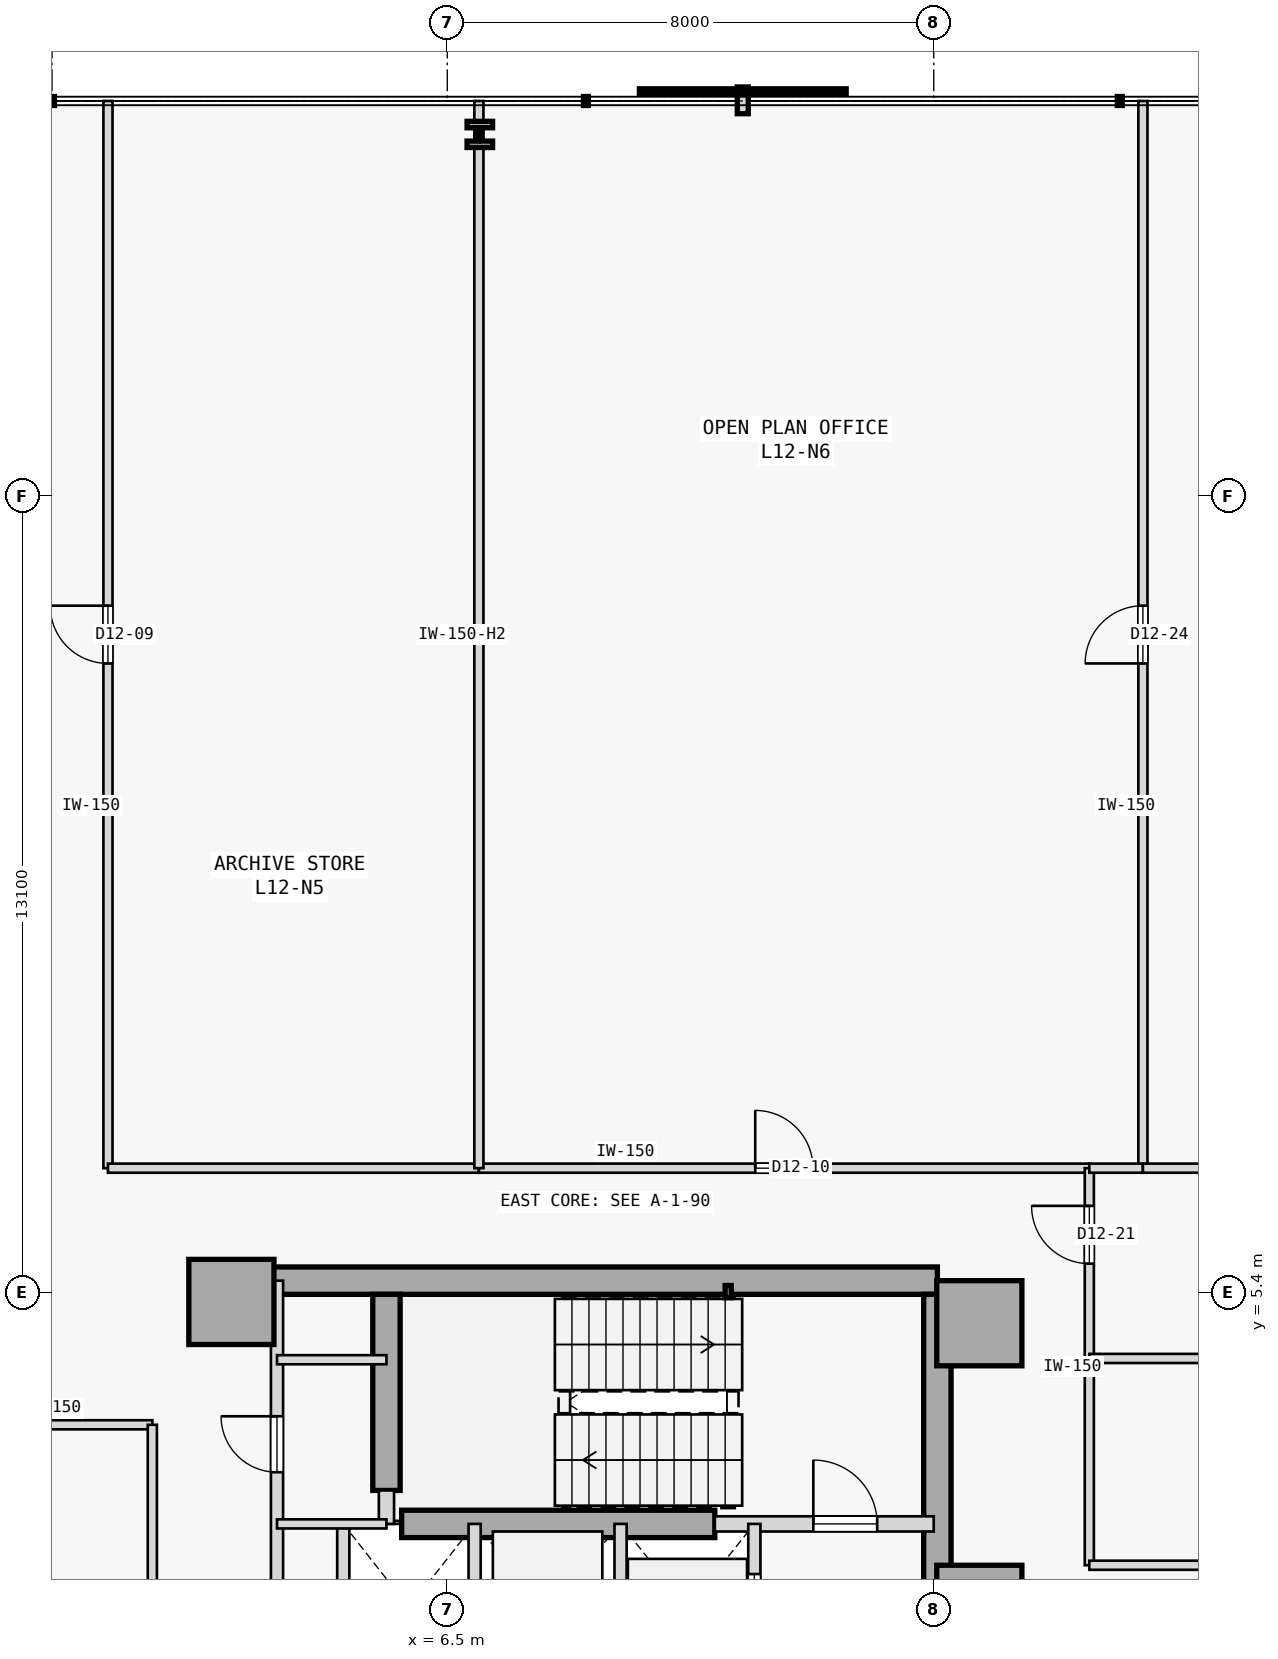
"""IFC4 building model, lengths in metres.
Left out: names, types, materials, properties, quantities, classifications, styles, units other than length and angle.
Written with IfcOpenShell. Run it as: python <this file> out.ifc"""

import sys

from ifc_helpers import new_model, si_unit, direction, frame, frame_2d, origin, origin_2d, place, context, subcontext, project, spatial, rectangle, hollow_rectangle, i_section, extrude, element, fill, save


model = new_model("IFC4")
c1 = context("Model", 3, precision=1e-05, world=origin(), true_north=direction((0.0, 1.0)))
c2 = subcontext(c1, "Body", "Model", "MODEL_VIEW")
j1 = project(units=[si_unit("LENGTHUNIT", "METRE"), si_unit("PLANEANGLEUNIT", "RADIAN")], contexts=[c1])
p1 = place(None, origin())
s1 = spatial("IfcSite", under=j1, at=p1, CompositionType="ELEMENT")
p2 = place(p1, origin())
s2 = spatial("IfcBuilding", under=s1, at=p2, CompositionType="ELEMENT")
p3 = place(p2, frame((0.0, 0.0, 52.2)))
s3 = spatial("IfcBuildingStorey", under=s2, at=p3, CompositionType="ELEMENT", Elevation=52.2)
for number, where, z_axis, x_axis in (
    (1, (15.25, 4.9, 0.0), (0.0, 0.0, 1.0), (1.0, 0.0, 0.0)),
    (2, (15.25, 0.22, 0.0), (0.0, 0.0, 1.0), (1.0, 0.0, 0.0)),
    (3, (2.95, 5.25, 0.0), (0.0, 0.0, 1.0), (1.0, 0.0, 0.0)),
):
    element("IfcColumn", number, at=place(p3, frame(where, z_axis=z_axis, x_axis=x_axis)), inside=s3, PredefinedType="COLUMN", context=c2, shape_type="SweptSolid", body=[
        extrude(rectangle(XDim=1.4, YDim=1.4, at=origin_2d()), origin(), (0.0, 0.0, 1.0), 3.8),
    ])
p4 = place(p3, frame((3.15, 5.6, 0.0), z_axis=(0.0, 0.0, 1.0), x_axis=(1.0, 0.0, 0.0)))
e4 = element("IfcWall", 4, at=p4, inside=s3, PredefinedType="SHEAR", context=c2, shape_type="SweptSolid", body=[
    extrude(rectangle(XDim=11.41, YDim=0.45, at=frame_2d((5.705, 0.0))), origin(), (0.0, 0.0, 1.0), 3.575),
])
p5 = place(p3, frame((14.56, -5.375, 0.0), z_axis=(0.0, 0.0, 1.0), x_axis=(0.0, 1.0, 0.0)))
e5 = element("IfcWall", 5, at=p5, inside=s3, PredefinedType="SHEAR", context=c2, shape_type="SweptSolid", body=[
    extrude(rectangle(XDim=10.75, YDim=0.45, at=frame_2d((5.375, 0.0))), origin(), (0.0, 0.0, 1.0), 3.575),
])
p6 = place(p3, frame((5.5, 2.15, 0.0), z_axis=(0.0, 0.0, 1.0), x_axis=(0.0, 1.0, 0.0)))
e6 = element("IfcWall", 6, at=p6, inside=s3, PredefinedType="SHEAR", context=c2, shape_type="SweptSolid", body=[
    extrude(rectangle(XDim=3.225, YDim=0.45, at=frame_2d((1.613, 0.0))), origin(), (0.0, 0.0, 1.0), 3.575),
])
p7 = place(p3, frame((5.75, 1.6, 0.0), z_axis=(0.0, 0.0, 1.0), x_axis=(1.0, 0.0, 0.0)))
e7 = element("IfcWall", 7, at=p7, inside=s3, PredefinedType="SHEAR", context=c2, shape_type="SweptSolid", body=[
    extrude(rectangle(XDim=5.15, YDim=0.45, at=frame_2d((2.575, 0.0))), origin(), (0.0, 0.0, 1.0), 3.575),
])
p8 = place(p3, frame((11.12, 5.42, 0.0), z_axis=(0.0, 0.0, 1.0), x_axis=(1.0, 0.0, 0.0)))
e8 = element("IfcColumn", 8, at=p8, inside=s3, PredefinedType="COLUMN", context=c2, shape_type="SweptSolid", body=[
    extrude(hollow_rectangle(XDim=0.1, YDim=0.2, WallThickness=0.008, at=origin_2d()), origin(), (0.0, 0.0, 1.0), 3.8),
])
p9 = place(p3, frame((7.036, 24.45, 0.0), z_axis=(0.0, 0.0, 1.0), x_axis=(1.0, 0.0, 0.0)))
e9 = element("IfcColumn", 9, at=p9, inside=s3, PredefinedType="COLUMN", context=c2, shape_type="SweptSolid", body=[
    extrude(i_section(OverallWidth=0.42, OverallDepth=0.431, WebThickness=0.065, FlangeThickness=0.106, FilletRadius=0.015, at=origin_2d()), origin(), (0.0, 0.0, 1.0), 3.8),
])
p10 = place(p3, frame((10.9, 1.6, 0.0), z_axis=(0.0, 0.0, 1.0), x_axis=(1.0, 0.0, 0.0)))
e10 = element("IfcWall", 10, at=p10, inside=s3, PredefinedType="STANDARD", context=c2, shape_type="SweptSolid", body=[
    extrude(rectangle(XDim=3.6, YDim=0.25, at=frame_2d((1.8, 0.0))), origin(), (0.0, 0.0, 1.0), 3.575),
])
p11 = place(p10, frame((1.62, 0.0, 0.0)))
e11 = element("IfcOpeningElement", 11, at=p11, cuts=e10, PredefinedType="OPENING", context=c2, shape_type="SweptSolid", body=[
    extrude(rectangle(XDim=1.05, YDim=2.15, at=frame_2d((0.525, 1.075))), frame((0.0, 0.135, 0.0), z_axis=(0.0, -1.0, 0.0), x_axis=(1.0, 0.0, 0.0)), (0.0, 0.0, 1.0), 0.27),
])
p12 = place(p3, frame((5.5, 1.6, 0.0), z_axis=(0.0, 0.0, 1.0), x_axis=(0.0, 1.0, 0.0)))
e12 = element("IfcWall", 12, at=p12, inside=s3, PredefinedType="STANDARD", context=c2, shape_type="SweptSolid", body=[
    extrude(rectangle(XDim=0.55, YDim=0.25, at=frame_2d((0.275, 0.0))), origin(), (0.0, 0.0, 1.0), 3.575),
])
p13 = place(p3, frame((3.7, -1.15, 0.0), z_axis=(0.0, 0.0, 1.0), x_axis=(0.0, 1.0, 0.0)))
e13 = element("IfcWall", 13, at=p13, inside=s3, PredefinedType="STANDARD", context=c2, shape_type="SweptSolid", body=[
    extrude(rectangle(XDim=6.75, YDim=0.2, at=frame_2d((3.375, 0.0))), origin(), (0.0, 0.0, 1.0), 3.575),
])
p14 = place(p13, frame((3.6, 0.0, 0.0)))
e14 = element("IfcOpeningElement", 14, at=p14, cuts=e13, PredefinedType="OPENING", context=c2, shape_type="SweptSolid", body=[
    extrude(rectangle(XDim=0.92, YDim=2.15, at=frame_2d((0.46, 1.075))), frame((0.0, 0.11, 0.0), z_axis=(0.0, -1.0, 0.0), x_axis=(1.0, 0.0, 0.0)), (0.0, 0.0, 1.0), 0.22),
])
p15 = place(p13, frame((0.85, 0.0, 0.0)))
e15 = element("IfcOpeningElement", 15, at=p15, cuts=e13, PredefinedType="OPENING", context=c2, shape_type="SweptSolid", body=[
    extrude(rectangle(XDim=0.9, YDim=2.15, at=frame_2d((0.45, 1.075))), frame((0.0, 0.11, 0.0), z_axis=(0.0, -1.0, 0.0), x_axis=(1.0, 0.0, 0.0)), (0.0, 0.0, 1.0), 0.22),
])
p16 = place(p3, frame((11.55, -1.15, 0.0), z_axis=(0.0, 0.0, 1.0), x_axis=(0.0, 1.0, 0.0)))
e16 = element("IfcWall", 16, at=p16, inside=s3, PredefinedType="STANDARD", context=c2, shape_type="SweptSolid", body=[
    extrude(rectangle(XDim=2.75, YDim=0.2, at=frame_2d((1.375, 0.0))), origin(), (0.0, 0.0, 1.0), 3.575),
])
p17 = place(p16, frame((0.825, 0.0, 0.0)))
e17 = element("IfcOpeningElement", 17, at=p17, cuts=e16, PredefinedType="OPENING", context=c2, shape_type="SweptSolid", body=[
    extrude(rectangle(XDim=1.1, YDim=2.15, at=frame_2d((0.55, 1.075))), frame((0.0, 0.11, 0.0), z_axis=(0.0, -1.0, 0.0), x_axis=(1.0, 0.0, 0.0)), (0.0, 0.0, 1.0), 0.22),
])
for number, where, z_axis, x_axis in (
    (18, (9.35, -1.15, 0.0), (0.0, 0.0, 1.0), (0.0, 1.0, 0.0)),
    (19, (6.95, -1.15, 0.0), (0.0, 0.0, 1.0), (0.0, 1.0, 0.0)),
    (20, (4.79, -1.15, 0.0), (0.0, 0.0, 1.0), (0.0, 1.0, 0.0)),
):
    element("IfcWall", number, at=place(p3, frame(where, z_axis=z_axis, x_axis=x_axis)), inside=s3, PredefinedType="STANDARD", context=c2, shape_type="SweptSolid", body=[
        extrude(rectangle(XDim=2.75, YDim=0.2, at=frame_2d((1.375, 0.0))), origin(), (0.0, 0.0, 1.0), 3.575),
    ])
for number, where, z_axis, x_axis in (
    (21, (3.7, 4.3, 0.0), (0.0, 0.0, 1.0), (1.0, 0.0, 0.0)),
    (22, (3.7, 1.6, 0.0), (0.0, 0.0, 1.0), (1.0, 0.0, 0.0)),
):
    element("IfcWall", number, at=place(p3, frame(where, z_axis=z_axis, x_axis=x_axis)), inside=s3, PredefinedType="PARTITIONING", context=c2, shape_type="SweptSolid", body=[
        extrude(rectangle(XDim=1.8, YDim=0.15, at=frame_2d((0.9, 0.0))), origin(), (0.0, 0.0, 1.0), 3.575),
    ])
p18 = place(p3, frame((-1.65, 3.23, 0.0), z_axis=(0.0, 0.0, 1.0), x_axis=(1.0, 0.0, 0.0)))
e23 = element("IfcWall", 23, at=p18, inside=s3, PredefinedType="PARTITIONING", context=c2, shape_type="SweptSolid", body=[
    extrude(rectangle(XDim=3.3, YDim=0.15, at=frame_2d((1.65, 0.0))), origin(), (0.0, 0.0, 1.0), 3.575),
])
p19 = place(p3, frame((1.65, -3.23, 0.0), z_axis=(0.0, 0.0, 1.0), x_axis=(0.0, 1.0, 0.0)))
e24 = element("IfcWall", 24, at=p19, inside=s3, PredefinedType="PARTITIONING", context=c2, shape_type="SweptSolid", body=[
    extrude(rectangle(XDim=6.46, YDim=0.15, at=frame_2d((3.23, 0.0))), origin(), (0.0, 0.0, 1.0), 3.575),
])
p20 = place(p3, frame((0.92, 7.45, 0.0), z_axis=(0.0, 0.0, 1.0), x_axis=(0.0, 1.0, 0.0)))
e25 = element("IfcWall", 25, at=p20, inside=s3, PredefinedType="PARTITIONING", context=c2, shape_type="SweptSolid", body=[
    extrude(rectangle(XDim=17.55, YDim=0.15, at=frame_2d((8.775, 0.0))), origin(), (0.0, 0.0, 1.0), 3.575),
])
p21 = place(p20, frame((8.3, 0.0, 0.0)))
e26 = element("IfcOpeningElement", 26, at=p21, cuts=e25, PredefinedType="OPENING", context=c2, shape_type="SweptSolid", body=[
    extrude(rectangle(XDim=0.95, YDim=2.15, at=frame_2d((0.475, 1.075))), frame((0.0, 0.085, 0.0), z_axis=(0.0, -1.0, 0.0), x_axis=(1.0, 0.0, 0.0)), (0.0, 0.0, 1.0), 0.17),
])
p22 = place(p3, frame((0.92, 7.45, 0.0), z_axis=(0.0, 0.0, 1.0), x_axis=(1.0, 0.0, 0.0)))
e27 = element("IfcWall", 27, at=p22, inside=s3, PredefinedType="PARTITIONING", context=c2, shape_type="SweptSolid", body=[
    extrude(rectangle(XDim=6.1, YDim=0.15, at=frame_2d((3.05, 0.0))), origin(), (0.0, 0.0, 1.0), 3.575),
])
p23 = place(p3, frame((7.02, 7.45, 0.0), z_axis=(0.0, 0.0, 1.0), x_axis=(1.0, 0.0, 0.0)))
e28 = element("IfcWall", 28, at=p23, inside=s3, PredefinedType="PARTITIONING", context=c2, shape_type="SweptSolid", body=[
    extrude(rectangle(XDim=10.039, YDim=0.15, at=frame_2d((5.02, 0.0))), origin(), (0.0, 0.0, 1.0), 3.575),
])
p24 = place(p23, frame((4.544, 0.0, 0.0)))
e29 = element("IfcOpeningElement", 29, at=p24, cuts=e28, PredefinedType="OPENING", context=c2, shape_type="SweptSolid", body=[
    extrude(rectangle(XDim=0.95, YDim=2.15, at=frame_2d((0.475, 1.075))), frame((0.0, 0.085, 0.0), z_axis=(0.0, -1.0, 0.0), x_axis=(1.0, 0.0, 0.0)), (0.0, 0.0, 1.0), 0.17),
])
p25 = place(p3, frame((17.059, 0.92, 0.0), z_axis=(0.0, 0.0, 1.0), x_axis=(0.0, 1.0, 0.0)))
e30 = element("IfcWall", 30, at=p25, inside=s3, PredefinedType="PARTITIONING", context=c2, shape_type="SweptSolid", body=[
    extrude(rectangle(XDim=3.401, YDim=0.15, at=frame_2d((1.701, 0.0))), origin(), (0.0, 0.0, 1.0), 3.575),
])
p26 = place(p3, frame((17.059, 0.92, 0.0), z_axis=(0.0, 0.0, 1.0), x_axis=(1.0, 0.0, 0.0)))
e31 = element("IfcWall", 31, at=p26, inside=s3, PredefinedType="PARTITIONING", context=c2, shape_type="SweptSolid", body=[
    extrude(rectangle(XDim=21.941, YDim=0.15, at=frame_2d((10.97, 0.0))), origin(), (0.0, 0.0, 1.0), 3.125),
])
p27 = place(p26, frame((10.496, 0.0, 0.0)))
e32 = element("IfcOpeningElement", 32, at=p27, cuts=e31, PredefinedType="OPENING", context=c2, shape_type="SweptSolid", body=[
    extrude(rectangle(XDim=0.95, YDim=2.15, at=frame_2d((0.475, 1.075))), frame((0.0, 0.085, 0.0), z_axis=(0.0, -1.0, 0.0), x_axis=(1.0, 0.0, 0.0)), (0.0, 0.0, 1.0), 0.17),
])
p28 = place(p3, frame((17.059, 4.321, 0.0), z_axis=(0.0, 0.0, 1.0), x_axis=(0.0, 1.0, 0.0)))
e33 = element("IfcWall", 33, at=p28, inside=s3, PredefinedType="PARTITIONING", context=c2, shape_type="SweptSolid", body=[
    extrude(rectangle(XDim=3.129, YDim=0.15, at=frame_2d((1.564, 0.0))), origin(), (0.0, 0.0, 1.0), 3.575),
])
p29 = place(p28, frame((1.559, 0.0, 0.0)))
e34 = element("IfcOpeningElement", 34, at=p29, cuts=e33, PredefinedType="OPENING", context=c2, shape_type="SweptSolid", body=[
    extrude(rectangle(XDim=0.95, YDim=2.15, at=frame_2d((0.475, 1.075))), frame((0.0, 0.085, 0.0), z_axis=(0.0, -1.0, 0.0), x_axis=(1.0, 0.0, 0.0)), (0.0, 0.0, 1.0), 0.17),
])
p30 = place(p3, frame((7.02, 7.45, 0.0), z_axis=(0.0, 0.0, 1.0), x_axis=(0.0, 1.0, 0.0)))
e35 = element("IfcWall", 35, at=p30, inside=s3, PredefinedType="PARTITIONING", context=c2, shape_type="SweptSolid", body=[
    extrude(rectangle(XDim=17.55, YDim=0.15, at=frame_2d((8.775, 0.0))), origin(), (0.0, 0.0, 1.0), 2.975),
])
p31 = place(p3, frame((17.94, 7.45, 0.0), z_axis=(0.0, 0.0, 1.0), x_axis=(0.0, 1.0, 0.0)))
e36 = element("IfcWall", 36, at=p31, inside=s3, PredefinedType="PARTITIONING", context=c2, shape_type="SweptSolid", body=[
    extrude(rectangle(XDim=17.55, YDim=0.15, at=frame_2d((8.775, 0.0))), origin(), (0.0, 0.0, 1.0), 3.575),
])
p32 = place(p31, frame((8.3, 0.0, 0.0)))
e37 = element("IfcOpeningElement", 37, at=p32, cuts=e36, PredefinedType="OPENING", context=c2, shape_type="SweptSolid", body=[
    extrude(rectangle(XDim=0.95, YDim=2.15, at=frame_2d((0.475, 1.075))), frame((0.0, 0.085, 0.0), z_axis=(0.0, -1.0, 0.0), x_axis=(1.0, 0.0, 0.0)), (0.0, 0.0, 1.0), 0.17),
])
p33 = place(p3, frame((17.059, 7.45, 0.0), z_axis=(0.0, 0.0, 1.0), x_axis=(1.0, 0.0, 0.0)))
e38 = element("IfcWall", 38, at=p33, inside=s3, PredefinedType="PARTITIONING", context=c2, shape_type="SweptSolid", body=[
    extrude(rectangle(XDim=0.881, YDim=0.15, at=frame_2d((0.44, 0.0))), origin(), (0.0, 0.0, 1.0), 3.575),
])
p34 = place(p3, frame((17.94, 7.45, 0.0), z_axis=(0.0, 0.0, 1.0), x_axis=(1.0, 0.0, 0.0)))
e39 = element("IfcWall", 39, at=p34, inside=s3, PredefinedType="PARTITIONING", context=c2, shape_type="SweptSolid", body=[
    extrude(rectangle(XDim=10.14, YDim=0.15, at=frame_2d((5.07, 0.0))), origin(), (0.0, 0.0, 1.0), 3.125),
])
p35 = place(p3, frame((17.059, 4.321, 0.0), z_axis=(0.0, 0.0, 1.0), x_axis=(1.0, 0.0, 0.0)))
e40 = element("IfcWall", 40, at=p35, inside=s3, PredefinedType="PARTITIONING", context=c2, shape_type="SweptSolid", body=[
    extrude(rectangle(XDim=21.941, YDim=0.15, at=frame_2d((10.97, 0.0))), origin(), (0.0, 0.0, 1.0), 3.125),
])
p36 = place(p11, origin())
e41 = element("IfcDoor", 41, at=p36, inside=s3, OperationType="SINGLE_SWING_LEFT", PredefinedType="DOOR", context=c2, shape_type="SweptSolid", body=[
    extrude(rectangle(XDim=1.05, YDim=2.15, at=frame_2d((0.525, 1.075))), frame((0.0, 0.025, 0.0), z_axis=(0.0, -1.0, 0.0), x_axis=(1.0, 0.0, 0.0)), (0.0, 0.0, 1.0), 0.05),
])
fill(e11, e41)
p37 = place(p17, origin())
e42 = element("IfcDoor", 42, at=p37, inside=s3, OperationType="SLIDING_TO_RIGHT", PredefinedType="DOOR", context=c2, shape_type="SweptSolid", body=[
    extrude(rectangle(XDim=1.1, YDim=2.15, at=frame_2d((0.55, 1.075))), frame((0.0, 0.025, 0.0), z_axis=(0.0, -1.0, 0.0), x_axis=(1.0, 0.0, 0.0)), (0.0, 0.0, 1.0), 0.05),
])
fill(e17, e42)
p38 = place(p14, origin())
e43 = element("IfcDoor", 43, at=p38, inside=s3, OperationType="SINGLE_SWING_RIGHT", PredefinedType="DOOR", context=c2, shape_type="SweptSolid", body=[
    extrude(rectangle(XDim=0.92, YDim=2.15, at=frame_2d((0.46, 1.075))), frame((0.0, 0.025, 0.0), z_axis=(0.0, -1.0, 0.0), x_axis=(1.0, 0.0, 0.0)), (0.0, 0.0, 1.0), 0.05),
])
fill(e14, e43)
p39 = place(p21, origin())
e44 = element("IfcDoor", 44, at=p39, inside=s3, OperationType="SINGLE_SWING_RIGHT", PredefinedType="DOOR", context=c2, shape_type="SweptSolid", body=[
    extrude(rectangle(XDim=0.95, YDim=2.15, at=frame_2d((0.475, 1.075))), frame((0.0, 0.025, 0.0), z_axis=(0.0, -1.0, 0.0), x_axis=(1.0, 0.0, 0.0)), (0.0, 0.0, 1.0), 0.05),
])
fill(e26, e44)
p40 = place(p24, origin())
e45 = element("IfcDoor", 45, at=p40, inside=s3, OperationType="SINGLE_SWING_LEFT", PredefinedType="DOOR", context=c2, shape_type="SweptSolid", body=[
    extrude(rectangle(XDim=0.95, YDim=2.15, at=frame_2d((0.475, 1.075))), frame((0.0, 0.025, 0.0), z_axis=(0.0, -1.0, 0.0), x_axis=(1.0, 0.0, 0.0)), (0.0, 0.0, 1.0), 0.05),
])
fill(e29, e45)
p41 = place(p29, origin())
e46 = element("IfcDoor", 46, at=p41, inside=s3, OperationType="SINGLE_SWING_RIGHT", PredefinedType="DOOR", context=c2, shape_type="SweptSolid", body=[
    extrude(rectangle(XDim=0.95, YDim=2.15, at=frame_2d((0.475, 1.075))), frame((0.0, 0.025, 0.0), z_axis=(0.0, -1.0, 0.0), x_axis=(1.0, 0.0, 0.0)), (0.0, 0.0, 1.0), 0.05),
])
fill(e34, e46)
p42 = place(p32, origin())
e47 = element("IfcDoor", 47, at=p42, inside=s3, OperationType="SINGLE_SWING_LEFT", PredefinedType="DOOR", context=c2, shape_type="SweptSolid", body=[
    extrude(rectangle(XDim=0.95, YDim=2.15, at=frame_2d((0.475, 1.075))), frame((0.0, 0.025, 0.0), z_axis=(0.0, -1.0, 0.0), x_axis=(1.0, 0.0, 0.0)), (0.0, 0.0, 1.0), 0.05),
])
fill(e37, e47)
save(model, sys.argv[1])
